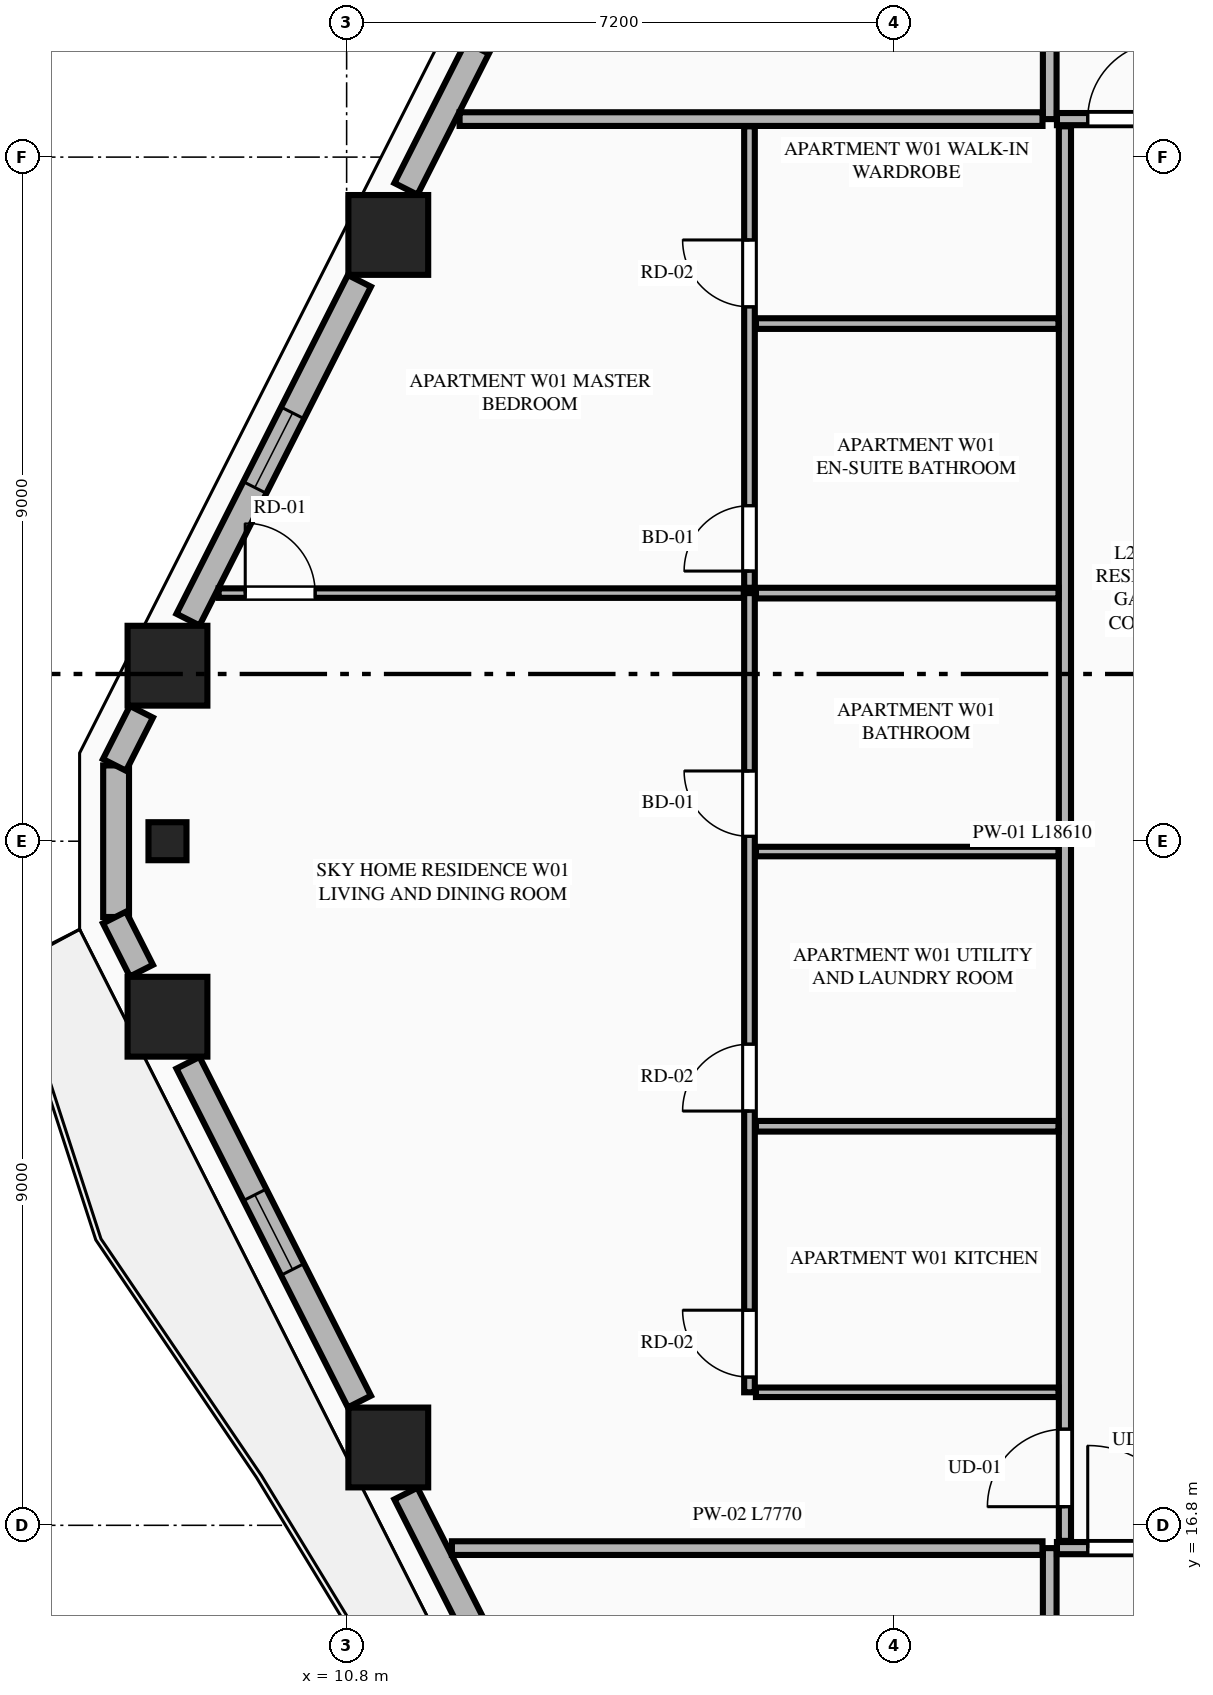
"""IFC4 building model, lengths in metres.
Left out: names, types, materials, properties, quantities, classifications, styles, units other than length and angle.
Written with IfcOpenShell. Run it as: python <this file> out.ifc"""

import sys

from ifc_helpers import new_model, si_unit, direction, frame, frame_2d, origin, origin_2d, place, context, subcontext, project, spatial, rectangle, extrude, element, fill, save


model = new_model("IFC4")
c1 = context("Model", 3, precision=1e-05, world=origin(), true_north=direction((0.0, 1.0)))
c2 = subcontext(c1, "Body", "Model", "MODEL_VIEW")
j1 = project(units=[si_unit("LENGTHUNIT", "METRE"), si_unit("PLANEANGLEUNIT", "RADIAN")], contexts=[c1])
p1 = place(None, origin())
s1 = spatial("IfcSite", under=j1, at=p1, CompositionType="ELEMENT")
p2 = place(p1, origin())
s2 = spatial("IfcBuilding", under=s1, at=p2, CompositionType="ELEMENT")
p3 = place(p2, frame((0.0, 0.0, 109.05)))
s3 = spatial("IfcBuildingStorey", under=s2, at=p3, CompositionType="ELEMENT", Elevation=109.05)
for number, where, z_axis, x_axis in (
    (1, (11.348, 33.776, 0.0), (0.0, 0.0, 1.0), (1.0, 0.0, 0.0)),
    (2, (8.443, 28.109, 0.0), (0.0, 0.0, 1.0), (1.0, 0.0, 0.0)),
    (3, (8.443, 23.491, 0.0), (0.0, 0.0, 1.0), (1.0, 0.0, 0.0)),
    (4, (11.348, 17.824, 0.0), (0.0, 0.0, 1.0), (1.0, 0.0, 0.0)),
):
    element("IfcColumn", number, at=place(p3, frame(where, z_axis=z_axis, x_axis=x_axis)), inside=s3, PredefinedType="COLUMN", context=c2, shape_type="SweptSolid", body=[
        extrude(rectangle(XDim=1.05, YDim=1.05, at=origin_2d()), origin(), (0.0, 0.0, 1.0), 3.55),
    ])
p4 = place(p3, frame((8.443, 25.8, 0.0), z_axis=(0.0, 0.0, 1.0), x_axis=(0.0, -1.0, 0.0)))
e5 = element("IfcColumn", 5, at=p4, inside=s3, PredefinedType="PILASTER", context=c2, shape_type="SweptSolid", body=[
    extrude(rectangle(XDim=0.5, YDim=0.35, at=origin_2d()), origin(), (0.0, 0.0, 1.0), 3.55),
])
p5 = place(p3, frame((7.767, 26.797, 0.0), z_axis=(0.0, 0.0, 1.0), x_axis=(0.0, -1.0, 0.0)))
e6 = element("IfcWall", 6, at=p5, inside=s3, PredefinedType="STANDARD", context=c2, shape_type="SweptSolid", body=[
    extrude(rectangle(XDim=1.994, YDim=0.34, at=frame_2d((0.997, 0.0))), origin(), (0.0, 0.0, 1.0), 3.34),
])
p6 = place(p3, frame((13.937, 39.039, 0.0), z_axis=(0.0, 0.0, 1.0), x_axis=(-0.451567731634, -0.892236842855, 0.0)))
e7 = element("IfcWall", 7, at=p6, inside=s3, PredefinedType="STANDARD", context=c2, shape_type="SweptSolid", body=[
    extrude(rectangle(XDim=5.219, YDim=0.34, at=frame_2d((2.61, 0.0))), origin(), (0.0, 0.0, 1.0), 2.797),
])
p7 = place(p6, frame((2.06, 0.0, 0.75)))
e8 = element("IfcOpeningElement", 8, at=p7, cuts=e7, PredefinedType="OPENING", context=c2, shape_type="SweptSolid", body=[
    extrude(rectangle(XDim=1.1, YDim=1.897, at=frame_2d((0.55, 0.948))), frame((0.0, 0.18, 0.0), z_axis=(0.0, -1.0, 0.0), x_axis=(1.0, 0.0, 0.0)), (0.0, 0.0, 1.0), 0.36),
])
p8 = place(p3, frame((10.968, 33.172, 0.0), z_axis=(0.0, 0.0, 1.0), x_axis=(-0.451470533039, -0.892286029139, 0.0)))
e9 = element("IfcWall", 9, at=p8, inside=s3, PredefinedType="STANDARD", context=c2, shape_type="SweptSolid", body=[
    extrude(rectangle(XDim=4.995, YDim=0.34, at=frame_2d((2.498, 0.0))), origin(), (0.0, 0.0, 1.0), 2.797),
])
p9 = place(p8, frame((1.947, 0.0, 0.75)))
e10 = element("IfcOpeningElement", 10, at=p9, cuts=e9, PredefinedType="OPENING", context=c2, shape_type="SweptSolid", body=[
    extrude(rectangle(XDim=1.1, YDim=1.897, at=frame_2d((0.55, 0.948))), frame((0.0, 0.18, 0.0), z_axis=(0.0, -1.0, 0.0), x_axis=(1.0, 0.0, 0.0)), (0.0, 0.0, 1.0), 0.36),
])
for number, where, z_axis, x_axis in (
    (11, (8.1, 27.503, 0.0), (0.0, 0.0, 1.0), (-0.452, -0.892, 0.0)),
    (12, (7.746, 24.796, 0.0), (0.0, 0.0, 1.0), (0.452, -0.892, 0.0)),
):
    element("IfcWall", number, at=place(p3, frame(where, z_axis=z_axis, x_axis=x_axis)), inside=s3, PredefinedType="STANDARD", context=c2, shape_type="SweptSolid", body=[
        extrude(rectangle(XDim=0.783, YDim=0.34, at=frame_2d((0.392, 0.0))), origin(), (0.0, 0.0, 1.0), 3.34),
    ])
p10 = place(p3, frame((8.713, 22.885, 0.0), z_axis=(0.0, 0.0, 1.0), x_axis=(0.451470533039, -0.892286029139, 0.0)))
e13 = element("IfcWall", 13, at=p10, inside=s3, PredefinedType="STANDARD", context=c2, shape_type="SweptSolid", body=[
    extrude(rectangle(XDim=4.995, YDim=0.34, at=frame_2d((2.498, 0.0))), origin(), (0.0, 0.0, 1.0), 2.797),
])
p11 = place(p10, frame((1.947, 0.0, 0.75)))
e14 = element("IfcOpeningElement", 14, at=p11, cuts=e13, PredefinedType="OPENING", context=c2, shape_type="SweptSolid", body=[
    extrude(rectangle(XDim=1.1, YDim=1.897, at=frame_2d((0.55, 0.948))), frame((0.0, 0.18, 0.0), z_axis=(0.0, -1.0, 0.0), x_axis=(1.0, 0.0, 0.0)), (0.0, 0.0, 1.0), 0.36),
])
p12 = place(p3, frame((11.58, 17.218, 0.0), z_axis=(0.0, 0.0, 1.0), x_axis=(0.451567731634, -0.892236842855, 0.0)))
e15 = element("IfcWall", 15, at=p12, inside=s3, PredefinedType="STANDARD", context=c2, shape_type="SweptSolid", body=[
    extrude(rectangle(XDim=5.219, YDim=0.34, at=frame_2d((2.61, 0.0))), origin(), (0.0, 0.0, 1.0), 2.797),
])
p13 = place(p12, frame((2.587, 0.0, 0.0)))
e16 = element("IfcOpeningElement", 16, at=p13, cuts=e15, PredefinedType="OPENING", context=c2, shape_type="SweptSolid", body=[
    extrude(rectangle(XDim=1.1, YDim=2.25, at=frame_2d((0.55, 1.125))), frame((0.0, 0.18, 0.0), z_axis=(0.0, -1.0, 0.0), x_axis=(1.0, 0.0, 0.0)), (0.0, 0.0, 1.0), 0.36),
])
p14 = place(p3, frame((20.05, 4.105, 0.0), z_axis=(0.0, 0.0, 1.0), x_axis=(0.0, 1.0, 0.0)))
e17 = element("IfcWall", 17, at=p14, inside=s3, PredefinedType="PARTITIONING", context=c2, shape_type="SweptSolid", body=[
    extrude(rectangle(XDim=12.395, YDim=0.18, at=frame_2d((6.198, 0.0))), origin(), (0.0, 0.0, 1.0), 3.34),
])
p15 = place(p3, frame((20.145, 16.5, 0.0), z_axis=(0.0, 0.0, 1.0), x_axis=(1.0, 0.0, 0.0)))
e18 = element("IfcWall", 18, at=p15, inside=s3, PredefinedType="PARTITIONING", context=c2, shape_type="SweptSolid", body=[
    extrude(rectangle(XDim=15.992, YDim=0.16, at=frame_2d((7.996, 0.0))), origin(), (0.0, 0.0, 1.0), 3.34),
])
p16 = place(p15, frame((0.405, 0.0, 0.0)))
e19 = element("IfcOpeningElement", 19, at=p16, cuts=e18, PredefinedType="OPENING", context=c2, shape_type="SweptSolid", body=[
    extrude(rectangle(XDim=1.35, YDim=2.35, at=frame_2d((0.675, 1.175))), frame((0.0, 0.09, 0.0), z_axis=(0.0, -1.0, 0.0), x_axis=(1.0, 0.0, 0.0)), (0.0, 0.0, 1.0), 0.18),
])
p17 = place(p3, frame((20.05, 35.3, 0.0), z_axis=(0.0, 0.0, 1.0), x_axis=(0.0, 1.0, 0.0)))
e20 = element("IfcWall", 20, at=p17, inside=s3, PredefinedType="PARTITIONING", context=c2, shape_type="SweptSolid", body=[
    extrude(rectangle(XDim=12.195, YDim=0.18, at=frame_2d((6.098, 0.0))), origin(), (0.0, 0.0, 1.0), 3.34),
])
p18 = place(p3, frame((20.145, 35.3, 0.0), z_axis=(0.0, 0.0, 1.0), x_axis=(1.0, 0.0, 0.0)))
e21 = element("IfcWall", 21, at=p18, inside=s3, PredefinedType="PARTITIONING", context=c2, shape_type="SweptSolid", body=[
    extrude(rectangle(XDim=8.328, YDim=0.16, at=frame_2d((4.164, 0.0))), origin(), (0.0, 0.0, 1.0), 3.34),
])
p19 = place(p18, frame((0.405, 0.0, 0.0)))
e22 = element("IfcOpeningElement", 22, at=p19, cuts=e21, PredefinedType="OPENING", context=c2, shape_type="SweptSolid", body=[
    extrude(rectangle(XDim=1.02, YDim=2.25, at=frame_2d((0.51, 1.125))), frame((0.0, 0.09, 0.0), z_axis=(0.0, -1.0, 0.0), x_axis=(1.0, 0.0, 0.0)), (0.0, 0.0, 1.0), 0.18),
])
p20 = place(p3, frame((12.185, 16.5, 0.0), z_axis=(0.0, 0.0, 1.0), x_axis=(1.0, 0.0, 0.0)))
e23 = element("IfcWall", 23, at=p20, inside=s3, PredefinedType="PARTITIONING", context=c2, shape_type="SweptSolid", body=[
    extrude(rectangle(XDim=7.77, YDim=0.18, at=frame_2d((3.885, 0.0))), origin(), (0.0, 0.0, 1.0), 3.34),
])
p21 = place(p3, frame((12.286, 35.3, 0.0), z_axis=(0.0, 0.0, 1.0), x_axis=(1.0, 0.0, 0.0)))
e24 = element("IfcWall", 24, at=p21, inside=s3, PredefinedType="PARTITIONING", context=c2, shape_type="SweptSolid", body=[
    extrude(rectangle(XDim=7.669, YDim=0.18, at=frame_2d((3.834, 0.0))), origin(), (0.0, 0.0, 1.0), 3.34),
])
p22 = place(p3, frame((20.25, 16.595, 0.0), z_axis=(0.0, 0.0, 1.0), x_axis=(0.0, 1.0, 0.0)))
e25 = element("IfcWall", 25, at=p22, inside=s3, PredefinedType="PARTITIONING", context=c2, shape_type="SweptSolid", body=[
    extrude(rectangle(XDim=18.61, YDim=0.16, at=frame_2d((9.305, 0.0))), origin(), (0.0, 0.0, 1.0), 3.34),
])
p23 = place(p22, frame((0.45, 0.0, 0.0)))
e26 = element("IfcOpeningElement", 26, at=p23, cuts=e25, PredefinedType="OPENING", context=c2, shape_type="SweptSolid", body=[
    extrude(rectangle(XDim=1.02, YDim=2.25, at=frame_2d((0.51, 1.125))), frame((0.0, 0.09, 0.0), z_axis=(0.0, -1.0, 0.0), x_axis=(1.0, 0.0, 0.0)), (0.0, 0.0, 1.0), 0.18),
])
p24 = place(p3, frame((16.185, 18.55, 0.0), z_axis=(0.0, 0.0, 1.0), x_axis=(1.0, 0.0, 0.0)))
e27 = element("IfcWall", 27, at=p24, inside=s3, PredefinedType="PARTITIONING", context=c2, shape_type="SweptSolid", body=[
    extrude(rectangle(XDim=3.98, YDim=0.125, at=frame_2d((1.99, 0.0))), origin(), (0.0, 0.0, 1.0), 2.722),
])
p25 = place(p3, frame((16.1, 18.55, 0.0), z_axis=(0.0, 0.0, 1.0), x_axis=(0.0, 1.0, 0.0)))
e28 = element("IfcWall", 28, at=p25, inside=s3, PredefinedType="PLUMBINGWALL", context=c2, shape_type="SweptSolid", body=[
    extrude(rectangle(XDim=10.514, YDim=0.14, at=frame_2d((5.257, 0.0))), origin(), (0.0, 0.0, 1.0), 3.34),
])
p26 = place(p25, frame((0.2, 0.0, 0.0)))
e29 = element("IfcOpeningElement", 29, at=p26, cuts=e28, PredefinedType="OPENING", context=c2, shape_type="SweptSolid", body=[
    extrude(rectangle(XDim=0.88, YDim=2.15, at=frame_2d((0.44, 1.075))), frame((0.0, 0.08, 0.0), z_axis=(0.0, -1.0, 0.0), x_axis=(1.0, 0.0, 0.0)), (0.0, 0.0, 1.0), 0.16),
])
p27 = place(p25, frame((3.7, 0.0, 0.0)))
e30 = element("IfcOpeningElement", 30, at=p27, cuts=e28, PredefinedType="OPENING", context=c2, shape_type="SweptSolid", body=[
    extrude(rectangle(XDim=0.88, YDim=2.15, at=frame_2d((0.44, 1.075))), frame((0.0, 0.08, 0.0), z_axis=(0.0, -1.0, 0.0), x_axis=(1.0, 0.0, 0.0)), (0.0, 0.0, 1.0), 0.16),
])
p28 = place(p25, frame((7.314, 0.0, 0.0)))
e31 = element("IfcOpeningElement", 31, at=p28, cuts=e28, PredefinedType="OPENING", context=c2, shape_type="SweptSolid", body=[
    extrude(rectangle(XDim=0.86, YDim=2.1, at=frame_2d((0.43, 1.05))), frame((0.0, 0.08, 0.0), z_axis=(0.0, -1.0, 0.0), x_axis=(1.0, 0.0, 0.0)), (0.0, 0.0, 1.0), 0.16),
])
p29 = place(p3, frame((16.1, 29.134, 0.0), z_axis=(0.0, 0.0, 1.0), x_axis=(0.0, 1.0, 0.0)))
e32 = element("IfcWall", 32, at=p29, inside=s3, PredefinedType="PLUMBINGWALL", context=c2, shape_type="SweptSolid", body=[
    extrude(rectangle(XDim=6.071, YDim=0.14, at=frame_2d((3.036, 0.0))), origin(), (0.0, 0.0, 1.0), 3.34),
])
p30 = place(p29, frame((0.22, 0.0, 0.0)))
e33 = element("IfcOpeningElement", 33, at=p30, cuts=e32, PredefinedType="OPENING", context=c2, shape_type="SweptSolid", body=[
    extrude(rectangle(XDim=0.86, YDim=2.1, at=frame_2d((0.43, 1.05))), frame((0.0, 0.08, 0.0), z_axis=(0.0, -1.0, 0.0), x_axis=(1.0, 0.0, 0.0)), (0.0, 0.0, 1.0), 0.16),
])
p31 = place(p29, frame((3.696, 0.0, 0.0)))
e34 = element("IfcOpeningElement", 34, at=p31, cuts=e32, PredefinedType="OPENING", context=c2, shape_type="SweptSolid", body=[
    extrude(rectangle(XDim=0.88, YDim=2.15, at=frame_2d((0.44, 1.075))), frame((0.0, 0.08, 0.0), z_axis=(0.0, -1.0, 0.0), x_axis=(1.0, 0.0, 0.0)), (0.0, 0.0, 1.0), 0.16),
])
p32 = place(p3, frame((16.185, 29.064, 0.0), z_axis=(0.0, 0.0, 1.0), x_axis=(1.0, 0.0, 0.0)))
e35 = element("IfcWall", 35, at=p32, inside=s3, PredefinedType="PLUMBINGWALL", context=c2, shape_type="SweptSolid", body=[
    extrude(rectangle(XDim=3.98, YDim=0.14, at=frame_2d((1.99, 0.0))), origin(), (0.0, 0.0, 1.0), 3.34),
])
p33 = place(p3, frame((9.116, 29.064, 0.0), z_axis=(0.0, 0.0, 1.0), x_axis=(1.0, 0.0, 0.0)))
e36 = element("IfcWall", 36, at=p33, inside=s3, PredefinedType="PARTITIONING", context=c2, shape_type="SweptSolid", body=[
    extrude(rectangle(XDim=6.909, YDim=0.125, at=frame_2d((3.455, 0.0))), origin(), (0.0, 0.0, 1.0), 3.34),
])
p34 = place(p33, frame((0.35, 0.0, 0.0)))
e37 = element("IfcOpeningElement", 37, at=p34, cuts=e36, PredefinedType="OPENING", context=c2, shape_type="SweptSolid", body=[
    extrude(rectangle(XDim=0.92, YDim=2.15, at=frame_2d((0.46, 1.075))), frame((0.0, 0.073, 0.0), z_axis=(0.0, -1.0, 0.0), x_axis=(1.0, 0.0, 0.0)), (0.0, 0.0, 1.0), 0.145),
])
p35 = place(p3, frame((16.185, 22.05, 0.0), z_axis=(0.0, 0.0, 1.0), x_axis=(1.0, 0.0, 0.0)))
e38 = element("IfcWall", 38, at=p35, inside=s3, PredefinedType="PLUMBINGWALL", context=c2, shape_type="SweptSolid", body=[
    extrude(rectangle(XDim=3.98, YDim=0.14, at=frame_2d((1.99, 0.0))), origin(), (0.0, 0.0, 1.0), 3.34),
])
p36 = place(p3, frame((16.185, 25.664, 0.0), z_axis=(0.0, 0.0, 1.0), x_axis=(1.0, 0.0, 0.0)))
e39 = element("IfcWall", 39, at=p36, inside=s3, PredefinedType="PARTITIONING", context=c2, shape_type="SweptSolid", body=[
    extrude(rectangle(XDim=3.98, YDim=0.125, at=frame_2d((1.99, 0.0))), origin(), (0.0, 0.0, 1.0), 3.34),
])
p37 = place(p3, frame((16.185, 32.61, 0.0), z_axis=(0.0, 0.0, 1.0), x_axis=(1.0, 0.0, 0.0)))
e40 = element("IfcWall", 40, at=p37, inside=s3, PredefinedType="PLUMBINGWALL", context=c2, shape_type="SweptSolid", body=[
    extrude(rectangle(XDim=3.98, YDim=0.14, at=frame_2d((1.99, 0.0))), origin(), (0.0, 0.0, 1.0), 3.34),
])
p38 = place(p9, origin())
e41 = element("IfcWindow", 41, at=p38, inside=s3, PartitioningType="SINGLE_PANEL", PredefinedType="WINDOW", context=c2, shape_type="SweptSolid", body=[
    extrude(rectangle(XDim=1.1, YDim=1.897, at=frame_2d((0.55, 0.948))), frame((0.0, 0.03, 0.0), z_axis=(0.0, -1.0, 0.0), x_axis=(1.0, 0.0, 0.0)), (0.0, 0.0, 1.0), 0.06),
])
fill(e10, e41)
p39 = place(p11, origin())
e42 = element("IfcWindow", 42, at=p39, inside=s3, PartitioningType="SINGLE_PANEL", PredefinedType="WINDOW", context=c2, shape_type="SweptSolid", body=[
    extrude(rectangle(XDim=1.1, YDim=1.897, at=frame_2d((0.55, 0.948))), frame((0.0, 0.03, 0.0), z_axis=(0.0, -1.0, 0.0), x_axis=(1.0, 0.0, 0.0)), (0.0, 0.0, 1.0), 0.06),
])
fill(e14, e42)
p40 = place(p16, origin())
e43 = element("IfcDoor", 43, at=p40, inside=s3, OperationType="SINGLE_SWING_LEFT", PredefinedType="DOOR", context=c2, shape_type="SweptSolid", body=[
    extrude(rectangle(XDim=1.35, YDim=2.35, at=frame_2d((0.675, 1.175))), frame((0.0, 0.025, 0.0), z_axis=(0.0, -1.0, 0.0), x_axis=(1.0, 0.0, 0.0)), (0.0, 0.0, 1.0), 0.05),
])
fill(e19, e43)
p41 = place(p19, origin())
e44 = element("IfcDoor", 44, at=p41, inside=s3, OperationType="SINGLE_SWING_RIGHT", PredefinedType="DOOR", context=c2, shape_type="SweptSolid", body=[
    extrude(rectangle(XDim=1.02, YDim=2.25, at=frame_2d((0.51, 1.125))), frame((0.0, 0.025, 0.0), z_axis=(0.0, -1.0, 0.0), x_axis=(1.0, 0.0, 0.0)), (0.0, 0.0, 1.0), 0.05),
])
fill(e22, e44)
p42 = place(p26, origin())
e45 = element("IfcDoor", 45, at=p42, inside=s3, OperationType="SINGLE_SWING_RIGHT", PredefinedType="DOOR", context=c2, shape_type="SweptSolid", body=[
    extrude(rectangle(XDim=0.88, YDim=2.15, at=frame_2d((0.44, 1.075))), frame((0.0, 0.025, 0.0), z_axis=(0.0, -1.0, 0.0), x_axis=(1.0, 0.0, 0.0)), (0.0, 0.0, 1.0), 0.05),
])
fill(e29, e45)
p43 = place(p27, origin())
e46 = element("IfcDoor", 46, at=p43, inside=s3, OperationType="SINGLE_SWING_LEFT", PredefinedType="DOOR", context=c2, shape_type="SweptSolid", body=[
    extrude(rectangle(XDim=0.88, YDim=2.15, at=frame_2d((0.44, 1.075))), frame((0.0, 0.025, 0.0), z_axis=(0.0, -1.0, 0.0), x_axis=(1.0, 0.0, 0.0)), (0.0, 0.0, 1.0), 0.05),
])
fill(e30, e46)
p44 = place(p28, origin())
e47 = element("IfcDoor", 47, at=p44, inside=s3, OperationType="SINGLE_SWING_RIGHT", PredefinedType="DOOR", context=c2, shape_type="SweptSolid", body=[
    extrude(rectangle(XDim=0.86, YDim=2.1, at=frame_2d((0.43, 1.05))), frame((0.0, 0.025, 0.0), z_axis=(0.0, -1.0, 0.0), x_axis=(1.0, 0.0, 0.0)), (0.0, 0.0, 1.0), 0.05),
])
fill(e31, e47)
p45 = place(p30, origin())
e48 = element("IfcDoor", 48, at=p45, inside=s3, OperationType="SINGLE_SWING_LEFT", PredefinedType="DOOR", context=c2, shape_type="SweptSolid", body=[
    extrude(rectangle(XDim=0.86, YDim=2.1, at=frame_2d((0.43, 1.05))), frame((0.0, 0.025, 0.0), z_axis=(0.0, -1.0, 0.0), x_axis=(1.0, 0.0, 0.0)), (0.0, 0.0, 1.0), 0.05),
])
fill(e33, e48)
p46 = place(p31, origin())
e49 = element("IfcDoor", 49, at=p46, inside=s3, OperationType="SINGLE_SWING_RIGHT", PredefinedType="DOOR", context=c2, shape_type="SweptSolid", body=[
    extrude(rectangle(XDim=0.88, YDim=2.15, at=frame_2d((0.44, 1.075))), frame((0.0, 0.025, 0.0), z_axis=(0.0, -1.0, 0.0), x_axis=(1.0, 0.0, 0.0)), (0.0, 0.0, 1.0), 0.05),
])
fill(e34, e49)
p47 = place(p23, origin())
e50 = element("IfcDoor", 50, at=p47, inside=s3, OperationType="SINGLE_SWING_LEFT", PredefinedType="DOOR", context=c2, shape_type="SweptSolid", body=[
    extrude(rectangle(XDim=1.02, YDim=2.25, at=frame_2d((0.51, 1.125))), frame((0.0, 0.025, 0.0), z_axis=(0.0, -1.0, 0.0), x_axis=(1.0, 0.0, 0.0)), (0.0, 0.0, 1.0), 0.05),
])
fill(e26, e50)
p48 = place(p34, origin())
e51 = element("IfcDoor", 51, at=p48, inside=s3, OperationType="SINGLE_SWING_LEFT", PredefinedType="DOOR", context=c2, shape_type="SweptSolid", body=[
    extrude(rectangle(XDim=0.92, YDim=2.15, at=frame_2d((0.46, 1.075))), frame((0.0, 0.025, 0.0), z_axis=(0.0, -1.0, 0.0), x_axis=(1.0, 0.0, 0.0)), (0.0, 0.0, 1.0), 0.05),
])
fill(e37, e51)
save(model, sys.argv[1])
